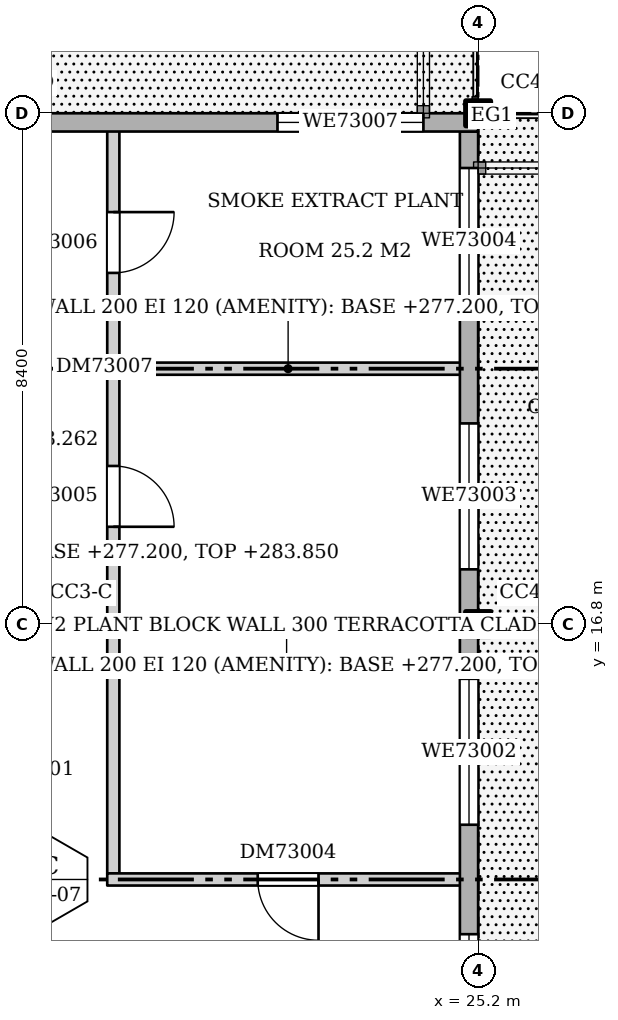
"""IFC4 building model, lengths in metres.
Left out: names, types, materials, properties, quantities, classifications, styles, units other than length and angle.
Written with IfcOpenShell. Run it as: python <this file> out.ifc"""

import sys

from ifc_helpers import new_model, si_unit, direction, frame, frame_2d, origin, origin_2d, place, context, subcontext, project, spatial, rectangle, hollow_circle, extrude, element, fill, save


model = new_model("IFC4")
c1 = context("Model", 3, precision=1e-05, world=origin(), true_north=direction((0.0, 1.0)))
c2 = subcontext(c1, "Body", "Model", "MODEL_VIEW")
j1 = project(units=[si_unit("LENGTHUNIT", "METRE"), si_unit("PLANEANGLEUNIT", "RADIAN")], contexts=[c1])
p1 = place(None, origin())
s1 = spatial("IfcSite", under=j1, at=p1, CompositionType="ELEMENT")
p2 = place(p1, origin())
s2 = spatial("IfcBuilding", under=s1, at=p2, CompositionType="ELEMENT")
p3 = place(p2, frame((0.0, 0.0, 277.2)))
s3 = spatial("IfcBuildingStorey", under=s2, at=p3, CompositionType="ELEMENT", Elevation=277.2)
for number, where, z_axis, x_axis in (
    (1, (25.2, 16.8, 0.0), (0.0, 0.0, 1.0), (1.0, 0.0, 0.0)),
    (2, (25.2, 25.2, 0.0), (0.0, 0.0, 1.0), (1.0, 0.0, 0.0)),
):
    element("IfcColumn", number, at=place(p3, frame(where, z_axis=z_axis, x_axis=x_axis)), inside=s3, PredefinedType="COLUMN", context=c2, shape_type="SweptSolid", body=[
        extrude(hollow_circle(Radius=0.203, WallThickness=0.016, at=origin_2d()), origin(), (0.0, 0.0, 1.0), 6.65),
    ])
p4 = place(p3, frame((19.2, 12.7, 0.0), z_axis=(0.0, 0.0, 1.0), x_axis=(0.0, 1.0, 0.0)))
e3 = element("IfcWall", 3, at=p4, inside=s3, PredefinedType="PARTITIONING", context=c2, shape_type="SweptSolid", body=[
    extrude(rectangle(XDim=4.0, YDim=0.2, at=frame_2d((2.0, 0.0))), origin(), (0.0, 0.0, 1.0), 6.65),
])
p5 = place(p3, frame((19.1, 12.6, 0.0), z_axis=(0.0, 0.0, 1.0), x_axis=(1.0, 0.0, 0.0)))
e4 = element("IfcWall", 4, at=p5, inside=s3, PredefinedType="PARTITIONING", context=c2, shape_type="SweptSolid", body=[
    extrude(rectangle(XDim=5.95, YDim=0.2, at=frame_2d((2.975, 0.0))), origin(), (0.0, 0.0, 1.0), 6.65),
])
p6 = place(p5, frame((2.475, 0.0, 0.0)))
e5 = element("IfcOpeningElement", 5, at=p6, cuts=e4, PredefinedType="OPENING", context=c2, shape_type="SweptSolid", body=[
    extrude(rectangle(XDim=1.0, YDim=2.1, at=frame_2d((0.5, 1.05))), frame((0.0, 0.11, 0.0), z_axis=(0.0, -1.0, 0.0), x_axis=(1.0, 0.0, 0.0)), (0.0, 0.0, 1.0), 0.22),
])
p7 = place(p3, frame((19.2, 16.9, 0.0), z_axis=(0.0, 0.0, 1.0), x_axis=(0.0, 1.0, 0.0)))
e6 = element("IfcWall", 6, at=p7, inside=s3, PredefinedType="PARTITIONING", context=c2, shape_type="SweptSolid", body=[
    extrude(rectangle(XDim=4.0, YDim=0.2, at=frame_2d((2.0, 0.0))), origin(), (0.0, 0.0, 1.0), 6.65),
])
p8 = place(p7, frame((1.5, 0.0, 0.0)))
e7 = element("IfcOpeningElement", 7, at=p8, cuts=e6, PredefinedType="OPENING", context=c2, shape_type="SweptSolid", body=[
    extrude(rectangle(XDim=1.0, YDim=2.1, at=frame_2d((0.5, 1.05))), frame((0.0, 0.11, 0.0), z_axis=(0.0, -1.0, 0.0), x_axis=(1.0, 0.0, 0.0)), (0.0, 0.0, 1.0), 0.22),
])
p9 = place(p3, frame((19.1, 16.8, 0.0), z_axis=(0.0, 0.0, 1.0), x_axis=(1.0, 0.0, 0.0)))
e8 = element("IfcWall", 8, at=p9, inside=s3, PredefinedType="PARTITIONING", context=c2, shape_type="SweptSolid", body=[
    extrude(rectangle(XDim=5.9, YDim=0.2, at=frame_2d((2.95, 0.0))), origin(), (0.0, 0.0, 1.0), 6.3),
])
p10 = place(p3, frame((19.2, 21.1, 0.0), z_axis=(0.0, 0.0, 1.0), x_axis=(0.0, 1.0, 0.0)))
e9 = element("IfcWall", 9, at=p10, inside=s3, PredefinedType="PARTITIONING", context=c2, shape_type="SweptSolid", body=[
    extrude(rectangle(XDim=3.95, YDim=0.2, at=frame_2d((1.975, 0.0))), origin(), (0.0, 0.0, 1.0), 6.65),
])
p11 = place(p10, frame((1.475, 0.0, 0.0)))
e10 = element("IfcOpeningElement", 10, at=p11, cuts=e9, PredefinedType="OPENING", context=c2, shape_type="SweptSolid", body=[
    extrude(rectangle(XDim=1.0, YDim=2.1, at=frame_2d((0.5, 1.05))), frame((0.0, 0.11, 0.0), z_axis=(0.0, -1.0, 0.0), x_axis=(1.0, 0.0, 0.0)), (0.0, 0.0, 1.0), 0.22),
])
p12 = place(p3, frame((19.1, 21.0, 0.0), z_axis=(0.0, 0.0, 1.0), x_axis=(1.0, 0.0, 0.0)))
e11 = element("IfcWall", 11, at=p12, inside=s3, PredefinedType="PARTITIONING", context=c2, shape_type="SweptSolid", body=[
    extrude(rectangle(XDim=5.95, YDim=0.2, at=frame_2d((2.975, 0.0))), origin(), (0.0, 0.0, 1.0), 6.65),
])
p13 = place(p3, frame((25.05, 8.7, 0.0), z_axis=(0.0, 0.0, 1.0), x_axis=(0.0, 1.0, 0.0)))
e12 = element("IfcWall", 12, at=p13, inside=s3, PredefinedType="SOLIDWALL", context=c2, shape_type="SweptSolid", body=[
    extrude(rectangle(XDim=16.2, YDim=0.3, at=frame_2d((8.1, 0.0))), origin(), (0.0, 0.0, 1.0), 6.3),
])
p14 = place(p13, frame((0.6, 0.0, 0.6)))
e13 = element("IfcOpeningElement", 13, at=p14, cuts=e12, PredefinedType="OPENING", context=c2, shape_type="SweptSolid", body=[
    extrude(rectangle(XDim=2.4, YDim=2.4, at=frame_2d((1.2, 1.2))), frame((0.0, 0.16, 0.0), z_axis=(0.0, -1.0, 0.0), x_axis=(1.0, 0.0, 0.0)), (0.0, 0.0, 1.0), 0.32),
])
p15 = place(p13, frame((4.8, 0.0, 0.6)))
e14 = element("IfcOpeningElement", 14, at=p15, cuts=e12, PredefinedType="OPENING", context=c2, shape_type="SweptSolid", body=[
    extrude(rectangle(XDim=2.4, YDim=2.4, at=frame_2d((1.2, 1.2))), frame((0.0, 0.16, 0.0), z_axis=(0.0, -1.0, 0.0), x_axis=(1.0, 0.0, 0.0)), (0.0, 0.0, 1.0), 0.32),
])
p16 = place(p13, frame((9.0, 0.0, 0.6)))
e15 = element("IfcOpeningElement", 15, at=p16, cuts=e12, PredefinedType="OPENING", context=c2, shape_type="SweptSolid", body=[
    extrude(rectangle(XDim=2.4, YDim=2.4, at=frame_2d((1.2, 1.2))), frame((0.0, 0.16, 0.0), z_axis=(0.0, -1.0, 0.0), x_axis=(1.0, 0.0, 0.0)), (0.0, 0.0, 1.0), 0.32),
])
p17 = place(p13, frame((13.2, 0.0, 0.6)))
e16 = element("IfcOpeningElement", 16, at=p17, cuts=e12, PredefinedType="OPENING", context=c2, shape_type="SweptSolid", body=[
    extrude(rectangle(XDim=2.4, YDim=2.4, at=frame_2d((1.2, 1.2))), frame((0.0, 0.16, 0.0), z_axis=(0.0, -1.0, 0.0), x_axis=(1.0, 0.0, 0.0)), (0.0, 0.0, 1.0), 0.32),
])
p18 = place(p3, frame((25.2, 25.05, 0.0), z_axis=(0.0, 0.0, 1.0), x_axis=(-1.0, 0.0, 0.0)))
e17 = element("IfcWall", 17, at=p18, inside=s3, PredefinedType="SOLIDWALL", context=c2, shape_type="SweptSolid", body=[
    extrude(rectangle(XDim=16.8, YDim=0.3, at=frame_2d((8.4, 0.0))), origin(), (0.0, 0.0, 1.0), 6.3),
])
p19 = place(p18, frame((13.5, 0.0, 0.6)))
e18 = element("IfcOpeningElement", 18, at=p19, cuts=e17, PredefinedType="OPENING", context=c2, shape_type="SweptSolid", body=[
    extrude(rectangle(XDim=2.4, YDim=2.4, at=frame_2d((1.2, 1.2))), frame((0.0, 0.16, 0.0), z_axis=(0.0, -1.0, 0.0), x_axis=(1.0, 0.0, 0.0)), (0.0, 0.0, 1.0), 0.32),
])
p20 = place(p18, frame((9.0, 0.0, 0.6)))
e19 = element("IfcOpeningElement", 19, at=p20, cuts=e17, PredefinedType="OPENING", context=c2, shape_type="SweptSolid", body=[
    extrude(rectangle(XDim=2.4, YDim=2.4, at=frame_2d((1.2, 1.2))), frame((0.0, 0.16, 0.0), z_axis=(0.0, -1.0, 0.0), x_axis=(1.0, 0.0, 0.0)), (0.0, 0.0, 1.0), 0.32),
])
p21 = place(p18, frame((0.9, 0.0, 0.6)))
e20 = element("IfcOpeningElement", 20, at=p21, cuts=e17, PredefinedType="OPENING", context=c2, shape_type="SweptSolid", body=[
    extrude(rectangle(XDim=2.4, YDim=2.4, at=frame_2d((1.2, 1.2))), frame((0.0, 0.16, 0.0), z_axis=(0.0, -1.0, 0.0), x_axis=(1.0, 0.0, 0.0)), (0.0, 0.0, 1.0), 0.32),
])
p22 = place(p6, frame((1.0, 0.0, 0.0), z_axis=(0.0, 0.0, 1.0), x_axis=(-1.0, 0.0, 0.0)))
e21 = element("IfcDoor", 21, at=p22, inside=s3, OperationType="SINGLE_SWING_LEFT", PredefinedType="DOOR", context=c2, shape_type="SweptSolid", body=[
    extrude(rectangle(XDim=1.0, YDim=2.1, at=frame_2d((0.5, 1.05))), frame((0.0, 0.025, 0.0), z_axis=(0.0, -1.0, 0.0), x_axis=(1.0, 0.0, 0.0)), (0.0, 0.0, 1.0), 0.05),
])
fill(e5, e21)
p23 = place(p8, frame((1.0, 0.0, 0.0), z_axis=(0.0, 0.0, 1.0), x_axis=(-1.0, 0.0, 0.0)))
e22 = element("IfcDoor", 22, at=p23, inside=s3, OperationType="SINGLE_SWING_RIGHT", PredefinedType="DOOR", context=c2, shape_type="SweptSolid", body=[
    extrude(rectangle(XDim=1.0, YDim=2.1, at=frame_2d((0.5, 1.05))), frame((0.0, 0.025, 0.0), z_axis=(0.0, -1.0, 0.0), x_axis=(1.0, 0.0, 0.0)), (0.0, 0.0, 1.0), 0.05),
])
fill(e7, e22)
p24 = place(p11, frame((1.0, 0.0, 0.0), z_axis=(0.0, 0.0, 1.0), x_axis=(-1.0, 0.0, 0.0)))
e23 = element("IfcDoor", 23, at=p24, inside=s3, OperationType="SINGLE_SWING_LEFT", PredefinedType="DOOR", context=c2, shape_type="SweptSolid", body=[
    extrude(rectangle(XDim=1.0, YDim=2.1, at=frame_2d((0.5, 1.05))), frame((0.0, 0.025, 0.0), z_axis=(0.0, -1.0, 0.0), x_axis=(1.0, 0.0, 0.0)), (0.0, 0.0, 1.0), 0.05),
])
fill(e10, e23)
p25 = place(p14, origin())
e24 = element("IfcWindow", 24, at=p25, inside=s3, PartitioningType="SINGLE_PANEL", PredefinedType="WINDOW", context=c2, shape_type="SweptSolid", body=[
    extrude(rectangle(XDim=2.4, YDim=2.4, at=frame_2d((1.2, 1.2))), frame((0.0, 0.03, 0.0), z_axis=(0.0, -1.0, 0.0), x_axis=(1.0, 0.0, 0.0)), (0.0, 0.0, 1.0), 0.06),
])
fill(e13, e24)
p26 = place(p15, origin())
e25 = element("IfcWindow", 25, at=p26, inside=s3, PartitioningType="SINGLE_PANEL", PredefinedType="WINDOW", context=c2, shape_type="SweptSolid", body=[
    extrude(rectangle(XDim=2.4, YDim=2.4, at=frame_2d((1.2, 1.2))), frame((0.0, 0.03, 0.0), z_axis=(0.0, -1.0, 0.0), x_axis=(1.0, 0.0, 0.0)), (0.0, 0.0, 1.0), 0.06),
])
fill(e14, e25)
p27 = place(p16, origin())
e26 = element("IfcWindow", 26, at=p27, inside=s3, PartitioningType="SINGLE_PANEL", PredefinedType="WINDOW", context=c2, shape_type="SweptSolid", body=[
    extrude(rectangle(XDim=2.4, YDim=2.4, at=frame_2d((1.2, 1.2))), frame((0.0, 0.03, 0.0), z_axis=(0.0, -1.0, 0.0), x_axis=(1.0, 0.0, 0.0)), (0.0, 0.0, 1.0), 0.06),
])
fill(e15, e26)
p28 = place(p17, origin())
e27 = element("IfcWindow", 27, at=p28, inside=s3, PartitioningType="SINGLE_PANEL", PredefinedType="WINDOW", context=c2, shape_type="SweptSolid", body=[
    extrude(rectangle(XDim=2.4, YDim=2.4, at=frame_2d((1.2, 1.2))), frame((0.0, 0.03, 0.0), z_axis=(0.0, -1.0, 0.0), x_axis=(1.0, 0.0, 0.0)), (0.0, 0.0, 1.0), 0.06),
])
fill(e16, e27)
p29 = place(p21, origin())
e28 = element("IfcWindow", 28, at=p29, inside=s3, PartitioningType="SINGLE_PANEL", PredefinedType="WINDOW", context=c2, shape_type="SweptSolid", body=[
    extrude(rectangle(XDim=2.4, YDim=2.4, at=frame_2d((1.2, 1.2))), frame((0.0, 0.03, 0.0), z_axis=(0.0, -1.0, 0.0), x_axis=(1.0, 0.0, 0.0)), (0.0, 0.0, 1.0), 0.06),
])
fill(e20, e28)
p30 = place(p2, frame((0.0, 0.0, 284.2)))
p31 = place(p30, frame((0.0, 0.0, -0.35)))
p32 = place(p31, frame((20.8, 16.8, 0.0)))
p33 = place(p32, frame((0.0, 0.0, 0.3)))
e29 = element("IfcWindow", 29, at=p33, inside=s3, PartitioningType="SINGLE_PANEL", PredefinedType="SKYLIGHT", context=c2, shape_type="SweptSolid", body=[
    extrude(rectangle(XDim=1.0, YDim=1.0, at=origin_2d()), origin(), (0.0, 0.0, 1.0), 0.05),
])
save(model, sys.argv[1])
